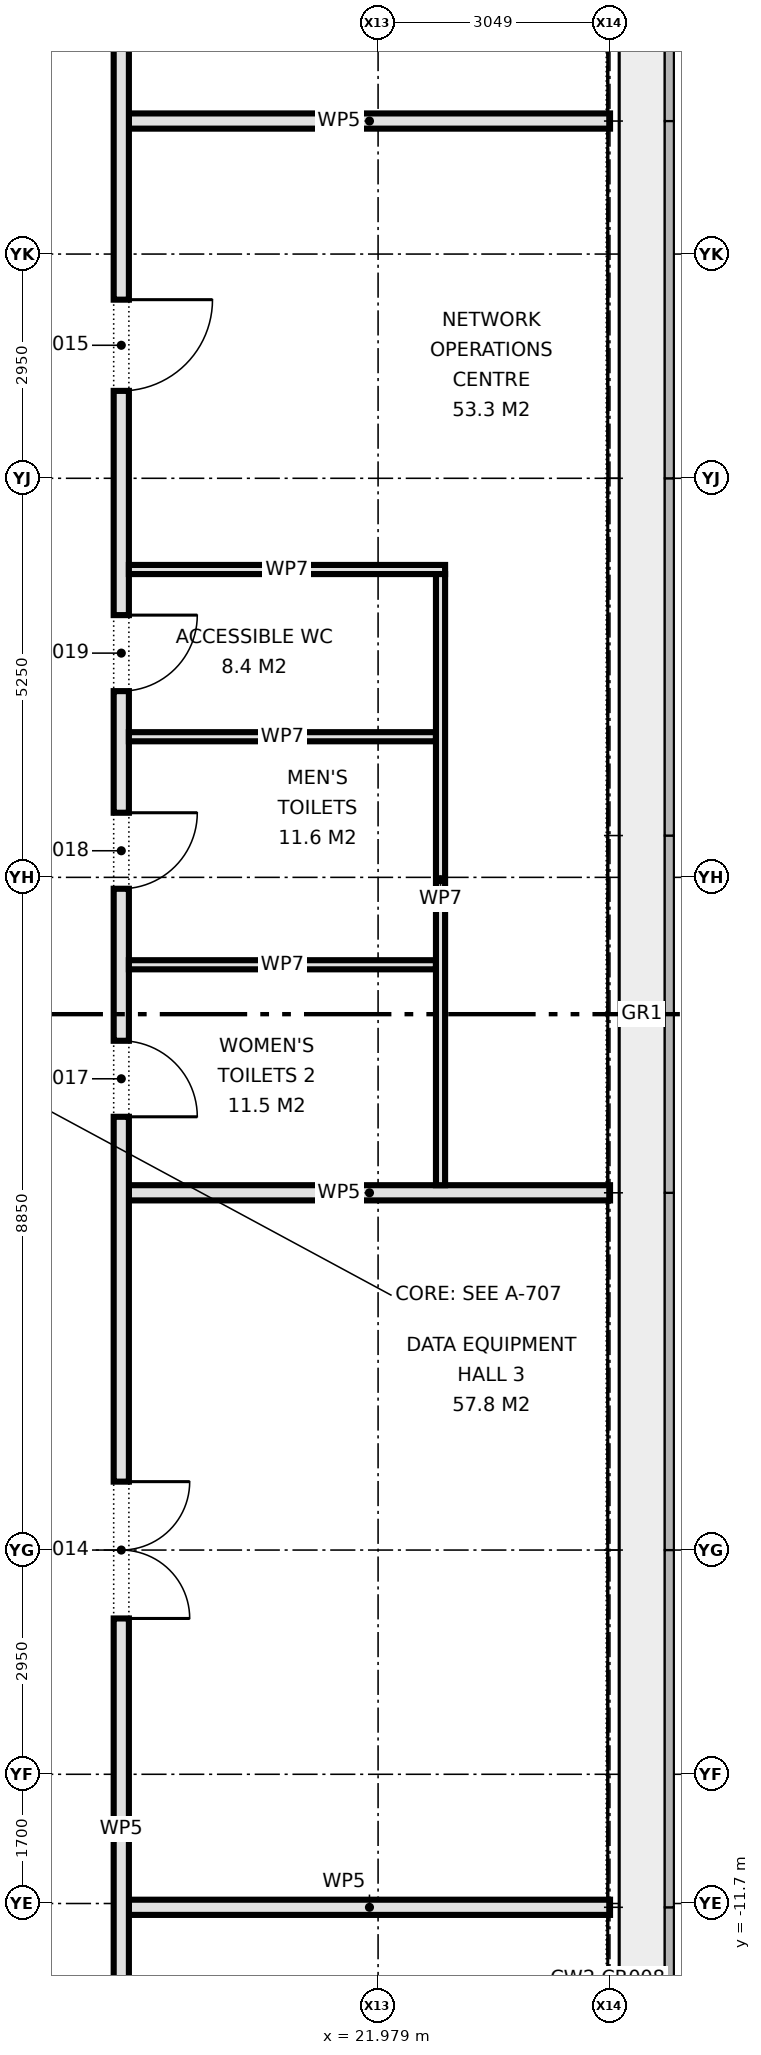
"""IFC4 building model, lengths in metres.
Left out: names, types, materials, properties, quantities, classifications, styles, units other than length and angle.
Written with IfcOpenShell. Run it as: python <this file> out.ifc"""

import sys

from ifc_helpers import new_model, si_unit, direction, frame, frame_2d, origin, place, context, subcontext, project, spatial, rectangle, extrude, element, fill, save


model = new_model("IFC4")
c1 = context("Model", 3, precision=1e-05, world=origin(), true_north=direction((0.0, 1.0)))
c2 = subcontext(c1, "Body", "Model", "MODEL_VIEW")
j1 = project(units=[si_unit("LENGTHUNIT", "METRE"), si_unit("PLANEANGLEUNIT", "RADIAN")], contexts=[c1])
p1 = place(None, origin())
s1 = spatial("IfcSite", under=j1, at=p1, CompositionType="ELEMENT")
p2 = place(p1, origin())
s2 = spatial("IfcBuilding", under=s1, at=p2, CompositionType="ELEMENT")
p3 = place(p2, frame((0.0, 0.0, 44.9)))
s3 = spatial("IfcBuildingStorey", under=s2, at=p3, CompositionType="ELEMENT", Elevation=44.9)
for number, where, z_axis, x_axis in (
    (1, (18.7, -11.75, 0.0), (0.0, 0.0, 1.0), (1.0, 0.0, 0.0)),
    (2, (18.7, -2.35, 0.0), (0.0, 0.0, 1.0), (1.0, 0.0, 0.0)),
    (3, (18.7, 11.75, 0.0), (0.0, 0.0, 1.0), (1.0, 0.0, 0.0)),
):
    element("IfcWall", number, at=place(p3, frame(where, z_axis=z_axis, x_axis=x_axis)), inside=s3, PredefinedType="PARTITIONING", context=c2, shape_type="SweptSolid", body=[
        extrude(rectangle(XDim=6.33, YDim=0.2, at=frame_2d((3.165, 0.0))), origin(), (0.0, 0.0, 1.0), 4.575),
    ])
p4 = place(p3, frame((18.6, -13.5, 0.0), z_axis=(0.0, 0.0, 1.0), x_axis=(0.0, 1.0, 0.0)))
e4 = element("IfcWall", 4, at=p4, inside=s3, PredefinedType="PARTITIONING", context=c2, shape_type="SweptSolid", body=[
    extrude(rectangle(XDim=27.0, YDim=0.2, at=frame_2d((13.5, 0.0))), origin(), (0.0, 0.0, 1.0), 4.575),
])
p5 = place(p4, frame((5.55, 0.0, 0.0)))
e5 = element("IfcOpeningElement", 5, at=p5, cuts=e4, PredefinedType="OPENING", context=c2, shape_type="SweptSolid", body=[
    extrude(rectangle(XDim=1.8, YDim=2.1, at=frame_2d((0.9, 1.05))), frame((0.0, 0.11, 0.0), z_axis=(0.0, -1.0, 0.0), x_axis=(1.0, 0.0, 0.0)), (0.0, 0.0, 1.0), 0.22),
])
p6 = place(p4, frame((21.7, 0.0, 0.0)))
e6 = element("IfcOpeningElement", 6, at=p6, cuts=e4, PredefinedType="OPENING", context=c2, shape_type="SweptSolid", body=[
    extrude(rectangle(XDim=1.2, YDim=2.1, at=frame_2d((0.6, 1.05))), frame((0.0, 0.11, 0.0), z_axis=(0.0, -1.0, 0.0), x_axis=(1.0, 0.0, 0.0)), (0.0, 0.0, 1.0), 0.22),
])
p7 = place(p4, frame((12.15, 0.0, 0.0)))
e7 = element("IfcOpeningElement", 7, at=p7, cuts=e4, PredefinedType="OPENING", context=c2, shape_type="SweptSolid", body=[
    extrude(rectangle(XDim=1.0, YDim=2.1, at=frame_2d((0.5, 1.05))), frame((0.0, 0.11, 0.0), z_axis=(0.0, -1.0, 0.0), x_axis=(1.0, 0.0, 0.0)), (0.0, 0.0, 1.0), 0.22),
])
p8 = place(p4, frame((15.15, 0.0, 0.0)))
e8 = element("IfcOpeningElement", 8, at=p8, cuts=e4, PredefinedType="OPENING", context=c2, shape_type="SweptSolid", body=[
    extrude(rectangle(XDim=1.0, YDim=2.1, at=frame_2d((0.5, 1.05))), frame((0.0, 0.11, 0.0), z_axis=(0.0, -1.0, 0.0), x_axis=(1.0, 0.0, 0.0)), (0.0, 0.0, 1.0), 0.22),
])
p9 = place(p4, frame((17.75, 0.0, 0.0)))
e9 = element("IfcOpeningElement", 9, at=p9, cuts=e4, PredefinedType="OPENING", context=c2, shape_type="SweptSolid", body=[
    extrude(rectangle(XDim=1.0, YDim=2.1, at=frame_2d((0.5, 1.05))), frame((0.0, 0.11, 0.0), z_axis=(0.0, -1.0, 0.0), x_axis=(1.0, 0.0, 0.0)), (0.0, 0.0, 1.0), 0.22),
])
for number, where, z_axis, x_axis in (
    (10, (18.7, 0.65, 0.0), (0.0, 0.0, 1.0), (1.0, 0.0, 0.0)),
    (11, (18.7, 3.65, 0.0), (0.0, 0.0, 1.0), (1.0, 0.0, 0.0)),
):
    element("IfcWall", number, at=place(p3, frame(where, z_axis=z_axis, x_axis=x_axis)), inside=s3, PredefinedType="PARTITIONING", context=c2, shape_type="SweptSolid", body=[
        extrude(rectangle(XDim=4.04, YDim=0.12, at=frame_2d((2.02, 0.0))), origin(), (0.0, 0.0, 1.0), 4.575),
    ])
p10 = place(p3, frame((18.7, 5.85, 0.0), z_axis=(0.0, 0.0, 1.0), x_axis=(1.0, 0.0, 0.0)))
e12 = element("IfcWall", 12, at=p10, inside=s3, PredefinedType="PARTITIONING", context=c2, shape_type="SweptSolid", body=[
    extrude(rectangle(XDim=4.16, YDim=0.12, at=frame_2d((2.08, 0.0))), origin(), (0.0, 0.0, 1.0), 4.575),
])
p11 = place(p3, frame((22.8, -2.25, 0.0), z_axis=(0.0, 0.0, 1.0), x_axis=(0.0, 1.0, 0.0)))
e13 = element("IfcWall", 13, at=p11, inside=s3, PredefinedType="PARTITIONING", context=c2, shape_type="SweptSolid", body=[
    extrude(rectangle(XDim=8.04, YDim=0.12, at=frame_2d((4.02, 0.0))), origin(), (0.0, 0.0, 1.0), 4.575),
])
p12 = place(p5, frame((1.8, 0.0, 0.0), z_axis=(0.0, 0.0, 1.0), x_axis=(-1.0, 0.0, 0.0)))
e14 = element("IfcDoor", 14, at=p12, inside=s3, OperationType="DOUBLE_DOOR_SINGLE_SWING", PredefinedType="DOOR", context=c2, shape_type="SweptSolid", body=[
    extrude(rectangle(XDim=1.8, YDim=2.1, at=frame_2d((0.9, 1.05))), frame((0.0, 0.025, 0.0), z_axis=(0.0, -1.0, 0.0), x_axis=(1.0, 0.0, 0.0)), (0.0, 0.0, 1.0), 0.05),
])
fill(e5, e14)
p13 = place(p6, frame((1.2, 0.0, 0.0), z_axis=(0.0, 0.0, 1.0), x_axis=(-1.0, 0.0, 0.0)))
e15 = element("IfcDoor", 15, at=p13, inside=s3, OperationType="SINGLE_SWING_LEFT", PredefinedType="DOOR", context=c2, shape_type="SweptSolid", body=[
    extrude(rectangle(XDim=1.2, YDim=2.1, at=frame_2d((0.6, 1.05))), frame((0.0, 0.025, 0.0), z_axis=(0.0, -1.0, 0.0), x_axis=(1.0, 0.0, 0.0)), (0.0, 0.0, 1.0), 0.05),
])
fill(e6, e15)
p14 = place(p7, frame((1.0, 0.0, 0.0), z_axis=(0.0, 0.0, 1.0), x_axis=(-1.0, 0.0, 0.0)))
e16 = element("IfcDoor", 16, at=p14, inside=s3, OperationType="SINGLE_SWING_RIGHT", PredefinedType="DOOR", context=c2, shape_type="SweptSolid", body=[
    extrude(rectangle(XDim=1.0, YDim=2.1, at=frame_2d((0.5, 1.05))), frame((0.0, 0.025, 0.0), z_axis=(0.0, -1.0, 0.0), x_axis=(1.0, 0.0, 0.0)), (0.0, 0.0, 1.0), 0.05),
])
fill(e7, e16)
p15 = place(p8, frame((1.0, 0.0, 0.0), z_axis=(0.0, 0.0, 1.0), x_axis=(-1.0, 0.0, 0.0)))
e17 = element("IfcDoor", 17, at=p15, inside=s3, OperationType="SINGLE_SWING_LEFT", PredefinedType="DOOR", context=c2, shape_type="SweptSolid", body=[
    extrude(rectangle(XDim=1.0, YDim=2.1, at=frame_2d((0.5, 1.05))), frame((0.0, 0.025, 0.0), z_axis=(0.0, -1.0, 0.0), x_axis=(1.0, 0.0, 0.0)), (0.0, 0.0, 1.0), 0.05),
])
fill(e8, e17)
p16 = place(p9, frame((1.0, 0.0, 0.0), z_axis=(0.0, 0.0, 1.0), x_axis=(-1.0, 0.0, 0.0)))
e18 = element("IfcDoor", 18, at=p16, inside=s3, OperationType="SINGLE_SWING_LEFT", PredefinedType="DOOR", context=c2, shape_type="SweptSolid", body=[
    extrude(rectangle(XDim=1.0, YDim=2.1, at=frame_2d((0.5, 1.05))), frame((0.0, 0.025, 0.0), z_axis=(0.0, -1.0, 0.0), x_axis=(1.0, 0.0, 0.0)), (0.0, 0.0, 1.0), 0.05),
])
fill(e9, e18)
save(model, sys.argv[1])
